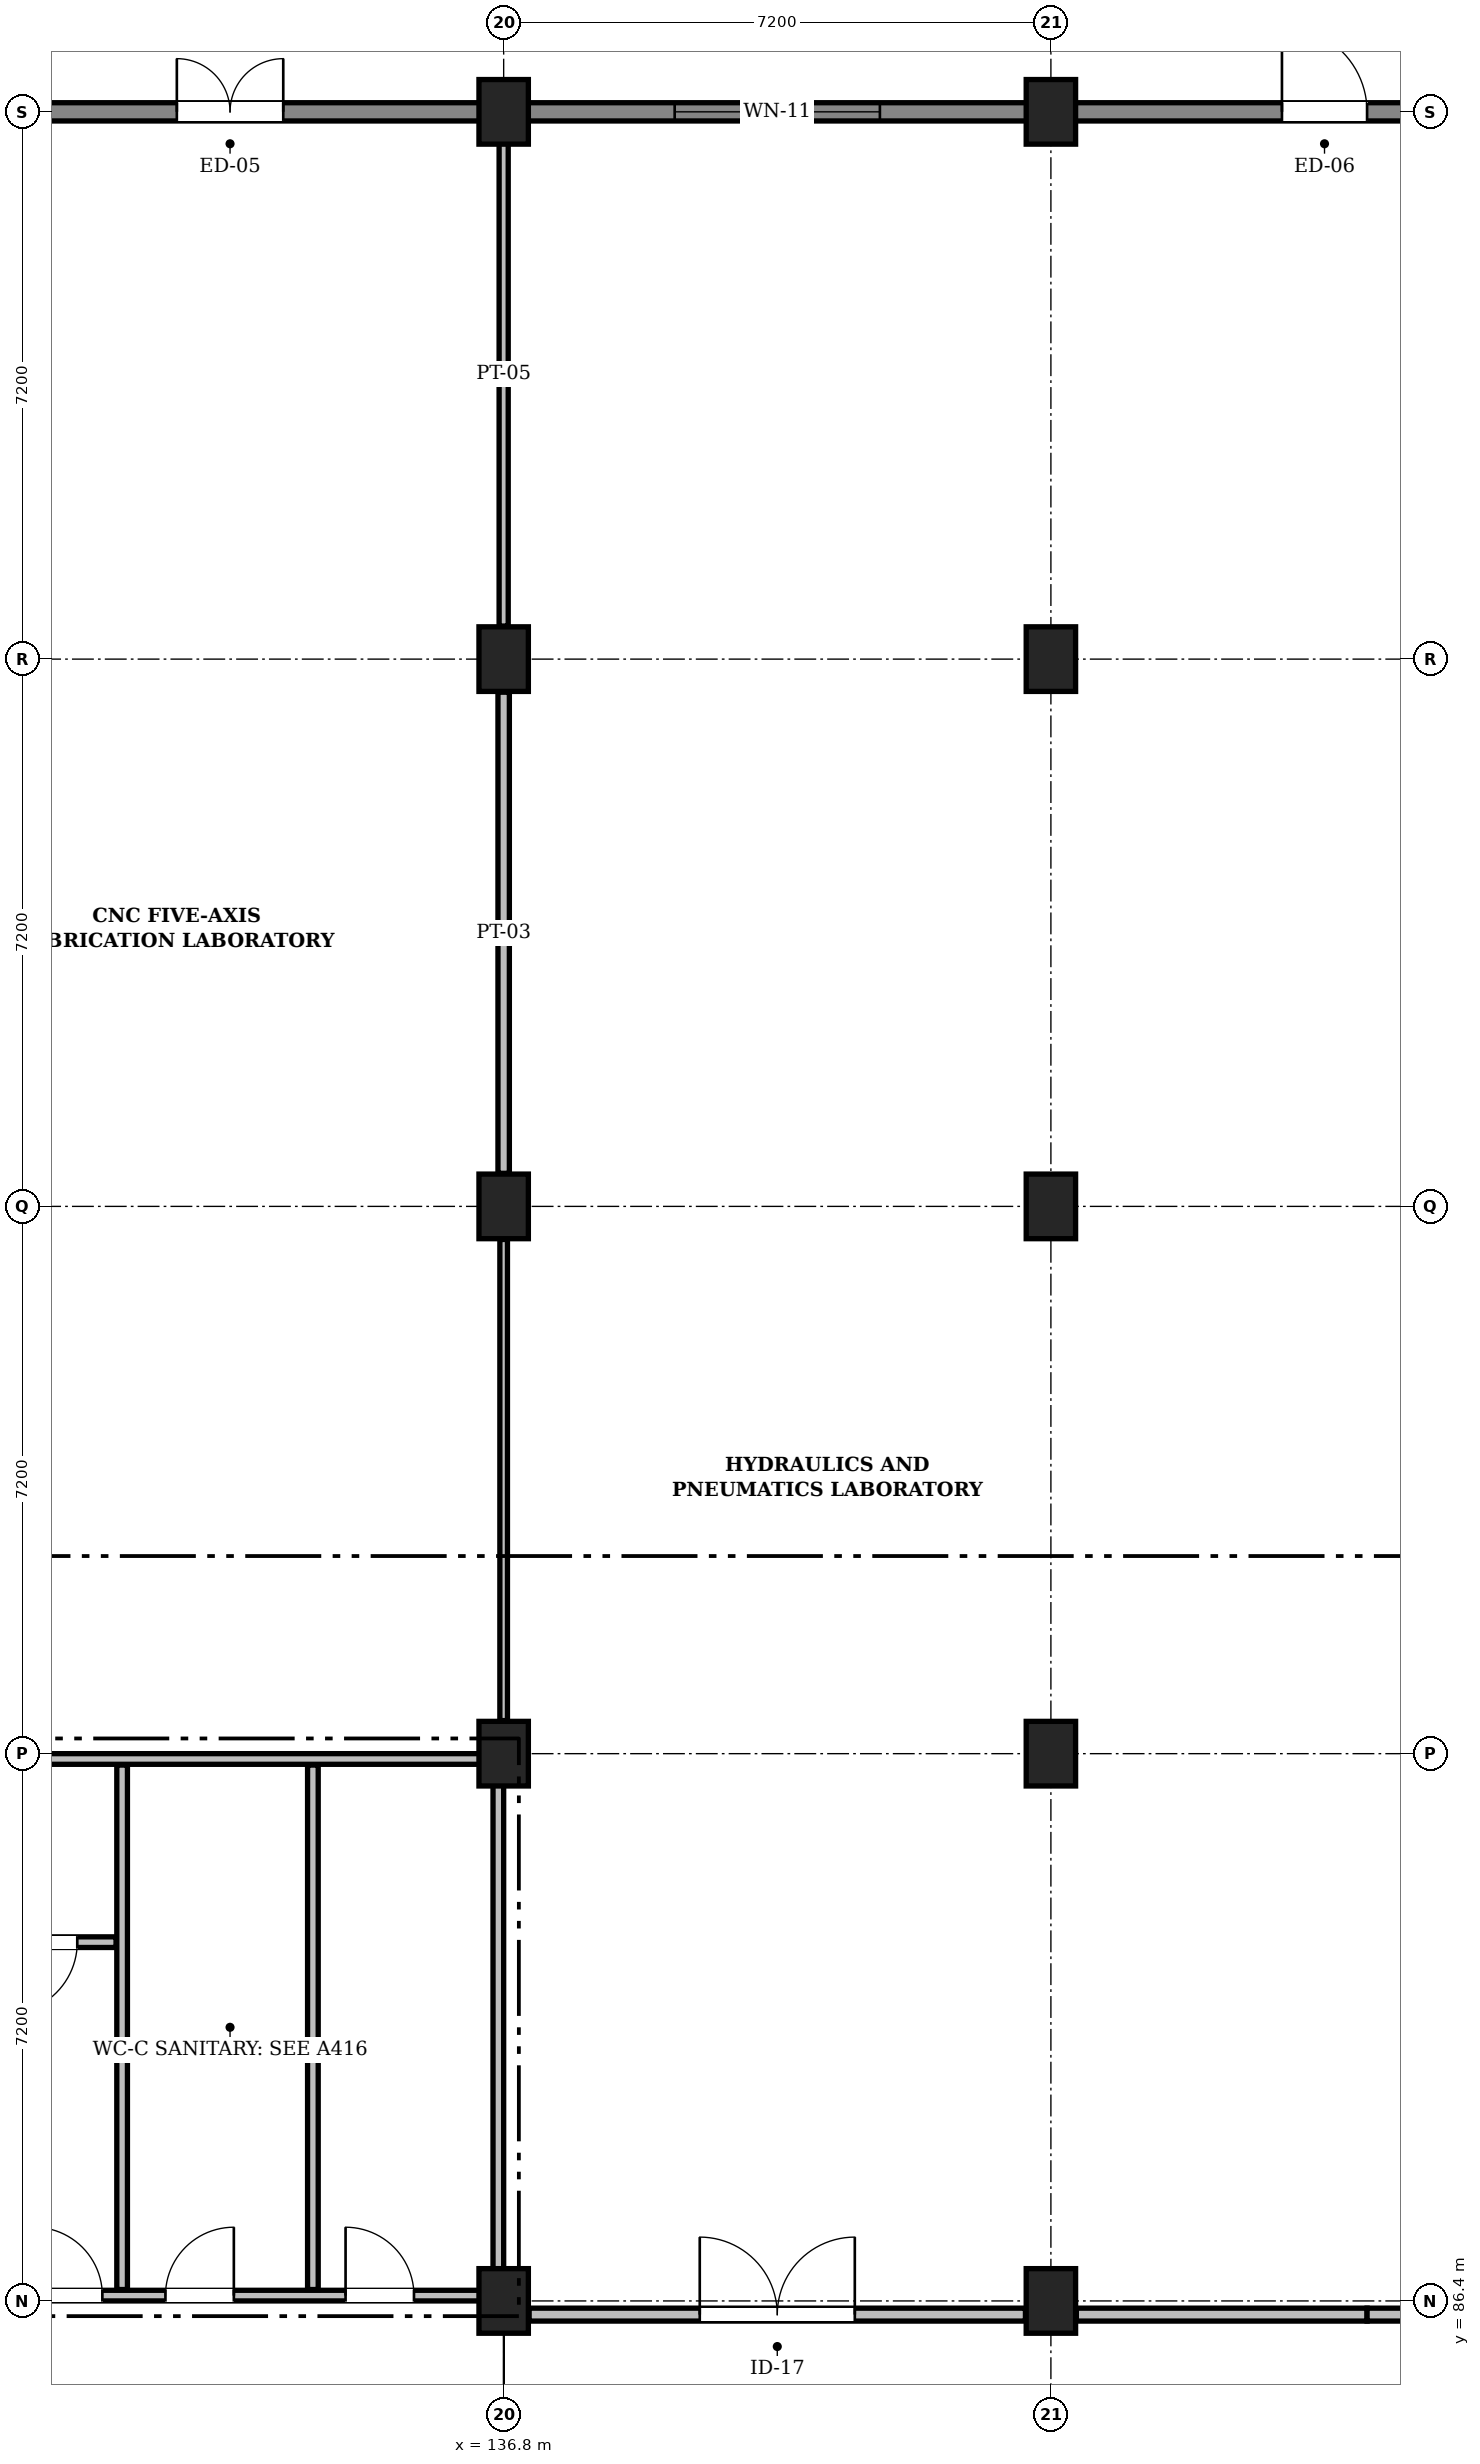
"""IFC4 building model, lengths in metres.
Left out: names, types, materials, properties, quantities, classifications, styles, units other than length and angle.
Written with IfcOpenShell. Run it as: python <this file> out.ifc"""

import sys

from ifc_helpers import new_model, si_unit, direction, frame, frame_2d, origin, origin_2d, place, context, subcontext, project, spatial, rectangle, extrude, element, fill, save


model = new_model("IFC4")
c1 = context("Model", 3, precision=1e-05, world=origin(), true_north=direction((0.0, 1.0)))
c2 = subcontext(c1, "Body", "Model", "MODEL_VIEW")
j1 = project(units=[si_unit("LENGTHUNIT", "METRE"), si_unit("PLANEANGLEUNIT", "RADIAN")], contexts=[c1])
p1 = place(None, origin())
s1 = spatial("IfcSite", under=j1, at=p1, CompositionType="ELEMENT")
p2 = place(p1, origin())
s2 = spatial("IfcBuilding", under=s1, at=p2, CompositionType="ELEMENT")
p3 = place(p2, origin())
s3 = spatial("IfcBuildingStorey", under=s2, at=p3, CompositionType="ELEMENT", Elevation=0.0)
for number, where, z_axis, x_axis in (
    (1, (136.8, 86.4, 0.0), (0.0, 0.0, 1.0), (1.0, 0.0, 0.0)),
    (2, (136.8, 93.6, 0.0), (0.0, 0.0, 1.0), (1.0, 0.0, 0.0)),
    (3, (136.8, 100.8, 0.0), (0.0, 0.0, 1.0), (1.0, 0.0, 0.0)),
    (4, (136.8, 108.0, 0.0), (0.0, 0.0, 1.0), (1.0, 0.0, 0.0)),
    (5, (136.8, 115.2, 0.0), (0.0, 0.0, 1.0), (1.0, 0.0, 0.0)),
    (6, (144.0, 86.4, 0.0), (0.0, 0.0, 1.0), (1.0, 0.0, 0.0)),
    (7, (144.0, 93.6, 0.0), (0.0, 0.0, 1.0), (1.0, 0.0, 0.0)),
    (8, (144.0, 100.8, 0.0), (0.0, 0.0, 1.0), (1.0, 0.0, 0.0)),
    (9, (144.0, 108.0, 0.0), (0.0, 0.0, 1.0), (1.0, 0.0, 0.0)),
    (10, (144.0, 115.2, 0.0), (0.0, 0.0, 1.0), (1.0, 0.0, 0.0)),
):
    element("IfcColumn", number, at=place(p3, frame(where, z_axis=z_axis, x_axis=x_axis)), inside=s3, PredefinedType="COLUMN", context=c2, shape_type="SweptSolid", body=[
        extrude(rectangle(XDim=0.65, YDim=0.85, at=origin_2d()), origin(), (0.0, 0.0, 1.0), 4.8),
    ])
p4 = place(p3, frame((129.6, 115.2, 0.0), z_axis=(0.0, 0.0, 1.0), x_axis=(1.0, 0.0, 0.0)))
e11 = element("IfcWall", 11, at=p4, inside=s3, PredefinedType="SOLIDWALL", context=c2, shape_type="SweptSolid", body=[
    extrude(rectangle(XDim=7.2, YDim=0.24, at=frame_2d((3.6, 0.0))), origin(), (0.0, 0.0, 1.0), 4.52),
])
p5 = place(p4, frame((2.9, 0.0, 0.0)))
e12 = element("IfcOpeningElement", 12, at=p5, cuts=e11, PredefinedType="OPENING", context=c2, shape_type="SweptSolid", body=[
    extrude(rectangle(XDim=1.4, YDim=2.15, at=frame_2d((0.7, 1.075))), frame((0.0, 0.132, 0.0), z_axis=(0.0, -1.0, 0.0), x_axis=(1.0, 0.0, 0.0)), (0.0, 0.0, 1.0), 0.264),
])
p6 = place(p3, frame((136.8, 115.2, 0.0), z_axis=(0.0, 0.0, 1.0), x_axis=(1.0, 0.0, 0.0)))
e13 = element("IfcWall", 13, at=p6, inside=s3, PredefinedType="SOLIDWALL", context=c2, shape_type="SweptSolid", body=[
    extrude(rectangle(XDim=7.2, YDim=0.24, at=frame_2d((3.6, 0.0))), origin(), (0.0, 0.0, 1.0), 4.52),
])
p7 = place(p6, frame((2.25, 0.0, 0.95)))
e14 = element("IfcOpeningElement", 14, at=p7, cuts=e13, PredefinedType="OPENING", context=c2, shape_type="SweptSolid", body=[
    extrude(rectangle(XDim=2.7, YDim=1.3, at=frame_2d((1.35, 0.65))), frame((0.0, 0.132, 0.0), z_axis=(0.0, -1.0, 0.0), x_axis=(1.0, 0.0, 0.0)), (0.0, 0.0, 1.0), 0.264),
])
p8 = place(p3, frame((144.0, 115.2, 0.0), z_axis=(0.0, 0.0, 1.0), x_axis=(1.0, 0.0, 0.0)))
e15 = element("IfcWall", 15, at=p8, inside=s3, PredefinedType="SOLIDWALL", context=c2, shape_type="SweptSolid", body=[
    extrude(rectangle(XDim=7.2, YDim=0.24, at=frame_2d((3.6, 0.0))), origin(), (0.0, 0.0, 1.0), 4.52),
])
p9 = place(p8, frame((3.04, 0.0, 0.0)))
e16 = element("IfcOpeningElement", 16, at=p9, cuts=e15, PredefinedType="OPENING", context=c2, shape_type="SweptSolid", body=[
    extrude(rectangle(XDim=1.12, YDim=2.15, at=frame_2d((0.56, 1.075))), frame((0.0, 0.132, 0.0), z_axis=(0.0, -1.0, 0.0), x_axis=(1.0, 0.0, 0.0)), (0.0, 0.0, 1.0), 0.264),
])
p10 = place(p3, frame((129.67, 86.47, 0.0), z_axis=(0.0, 0.0, 1.0), x_axis=(1.0, 0.0, 0.0)))
e17 = element("IfcWall", 17, at=p10, inside=s3, PredefinedType="PARTITIONING", context=c2, shape_type="SweptSolid", body=[
    extrude(rectangle(XDim=7.06, YDim=0.14, at=frame_2d((3.53, 0.0))), origin(), (0.0, 0.0, 1.0), 3.8),
])
p11 = place(p10, frame((0.95, 0.0, 0.0)))
e18 = element("IfcOpeningElement", 18, at=p11, cuts=e17, PredefinedType="OPENING", context=c2, shape_type="SweptSolid", body=[
    extrude(rectangle(XDim=0.9, YDim=2.08, at=frame_2d((0.45, 1.04))), frame((0.0, 0.082, 0.0), z_axis=(0.0, -1.0, 0.0), x_axis=(1.0, 0.0, 0.0)), (0.0, 0.0, 1.0), 0.164),
])
p12 = place(p10, frame((2.68, 0.0, 0.0)))
e19 = element("IfcOpeningElement", 19, at=p12, cuts=e17, PredefinedType="OPENING", context=c2, shape_type="SweptSolid", body=[
    extrude(rectangle(XDim=0.9, YDim=2.08, at=frame_2d((0.45, 1.04))), frame((0.0, 0.082, 0.0), z_axis=(0.0, -1.0, 0.0), x_axis=(1.0, 0.0, 0.0)), (0.0, 0.0, 1.0), 0.164),
])
p13 = place(p10, frame((5.05, 0.0, 0.0)))
e20 = element("IfcOpeningElement", 20, at=p13, cuts=e17, PredefinedType="OPENING", context=c2, shape_type="SweptSolid", body=[
    extrude(rectangle(XDim=0.9, YDim=2.08, at=frame_2d((0.45, 1.04))), frame((0.0, 0.082, 0.0), z_axis=(0.0, -1.0, 0.0), x_axis=(1.0, 0.0, 0.0)), (0.0, 0.0, 1.0), 0.164),
])
p14 = place(p3, frame((129.67, 93.53, 0.0), z_axis=(0.0, 0.0, 1.0), x_axis=(1.0, 0.0, 0.0)))
e21 = element("IfcWall", 21, at=p14, inside=s3, PredefinedType="PARTITIONING", context=c2, shape_type="SweptSolid", body=[
    extrude(rectangle(XDim=7.06, YDim=0.14, at=frame_2d((3.53, 0.0))), origin(), (0.0, 0.0, 1.0), 3.8),
])
p15 = place(p3, frame((136.73, 86.55, 0.0), z_axis=(0.0, 0.0, 1.0), x_axis=(0.0, 1.0, 0.0)))
e22 = element("IfcWall", 22, at=p15, inside=s3, PredefinedType="PARTITIONING", context=c2, shape_type="SweptSolid", body=[
    extrude(rectangle(XDim=6.9, YDim=0.14, at=frame_2d((3.45, 0.0))), origin(), (0.0, 0.0, 1.0), 4.08),
])
for number, where, z_axis, x_axis in (
    (23, (131.78, 86.55, 0.0), (0.0, 0.0, 1.0), (0.0, 1.0, 0.0)),
    (24, (134.29, 86.55, 0.0), (0.0, 0.0, 1.0), (0.0, 1.0, 0.0)),
):
    element("IfcWall", number, at=place(p3, frame(where, z_axis=z_axis, x_axis=x_axis)), inside=s3, PredefinedType="PARTITIONING", context=c2, shape_type="SweptSolid", body=[
        extrude(rectangle(XDim=6.9, YDim=0.14, at=frame_2d((3.45, 0.0))), origin(), (0.0, 0.0, 1.0), 4.46),
    ])
p16 = place(p3, frame((129.75, 91.12, 0.0), z_axis=(0.0, 0.0, 1.0), x_axis=(1.0, 0.0, 0.0)))
e25 = element("IfcWall", 25, at=p16, inside=s3, PredefinedType="PARTITIONING", context=c2, shape_type="SweptSolid", body=[
    extrude(rectangle(XDim=1.95, YDim=0.14, at=frame_2d((0.975, 0.0))), origin(), (0.0, 0.0, 1.0), 4.46),
])
p17 = place(p16, frame((0.5, 0.0, 0.0)))
e26 = element("IfcOpeningElement", 26, at=p17, cuts=e25, PredefinedType="OPENING", context=c2, shape_type="SweptSolid", body=[
    extrude(rectangle(XDim=0.94, YDim=2.1, at=frame_2d((0.47, 1.05))), frame((0.0, 0.082, 0.0), z_axis=(0.0, -1.0, 0.0), x_axis=(1.0, 0.0, 0.0)), (0.0, 0.0, 1.0), 0.164),
])
p18 = place(p3, frame((137.135, 86.22, 0.0), z_axis=(0.0, 0.0, 1.0), x_axis=(1.0, 0.0, 0.0)))
e27 = element("IfcWall", 27, at=p18, inside=s3, PredefinedType="PARTITIONING", context=c2, shape_type="SweptSolid", body=[
    extrude(rectangle(XDim=6.53, YDim=0.17, at=frame_2d((3.265, 0.0))), origin(), (0.0, 0.0, 1.0), 3.8),
])
p19 = place(p18, frame((2.245, 0.0, 0.0)))
e28 = element("IfcOpeningElement", 28, at=p19, cuts=e27, PredefinedType="OPENING", context=c2, shape_type="SweptSolid", body=[
    extrude(rectangle(XDim=2.04, YDim=2.34, at=frame_2d((1.02, 1.17))), frame((0.0, 0.097, 0.0), z_axis=(0.0, -1.0, 0.0), x_axis=(1.0, 0.0, 0.0)), (0.0, 0.0, 1.0), 0.194),
])
p20 = place(p3, frame((144.335, 86.22, 0.0), z_axis=(0.0, 0.0, 1.0), x_axis=(1.0, 0.0, 0.0)))
e29 = element("IfcWall", 29, at=p20, inside=s3, PredefinedType="PARTITIONING", context=c2, shape_type="SweptSolid", body=[
    extrude(rectangle(XDim=3.825, YDim=0.17, at=frame_2d((1.913, 0.0))), origin(), (0.0, 0.0, 1.0), 3.8),
])
p21 = place(p3, frame((148.16, 86.22, 0.0), z_axis=(0.0, 0.0, 1.0), x_axis=(1.0, 0.0, 0.0)))
e30 = element("IfcWall", 30, at=p21, inside=s3, PredefinedType="PARTITIONING", context=c2, shape_type="SweptSolid", body=[
    extrude(rectangle(XDim=2.325, YDim=0.17, at=frame_2d((1.163, 0.0))), origin(), (0.0, 0.0, 1.0), 3.8),
])
p22 = place(p3, frame((136.8, 94.035, 0.0), z_axis=(0.0, 0.0, 1.0), x_axis=(0.0, 1.0, 0.0)))
e31 = element("IfcWall", 31, at=p22, inside=s3, PredefinedType="PARTITIONING", context=c2, shape_type="SweptSolid", body=[
    extrude(rectangle(XDim=6.33, YDim=0.1, at=frame_2d((3.165, 0.0))), origin(), (0.0, 0.0, 1.0), 4.08),
])
p23 = place(p3, frame((136.8, 101.235, 0.0), z_axis=(0.0, 0.0, 1.0), x_axis=(0.0, 1.0, 0.0)))
e32 = element("IfcWall", 32, at=p23, inside=s3, PredefinedType="PARTITIONING", context=c2, shape_type="SweptSolid", body=[
    extrude(rectangle(XDim=6.33, YDim=0.15, at=frame_2d((3.165, 0.0))), origin(), (0.0, 0.0, 1.0), 4.08),
])
p24 = place(p3, frame((136.8, 108.435, 0.0), z_axis=(0.0, 0.0, 1.0), x_axis=(0.0, 1.0, 0.0)))
e33 = element("IfcWall", 33, at=p24, inside=s3, PredefinedType="PARTITIONING", context=c2, shape_type="SweptSolid", body=[
    extrude(rectangle(XDim=6.633, YDim=0.12, at=frame_2d((3.316, 0.0))), origin(), (0.0, 0.0, 1.0), 4.08),
])
p25 = place(p5, origin())
e34 = element("IfcDoor", 34, at=p25, inside=s3, OperationType="DOUBLE_DOOR_SINGLE_SWING", PredefinedType="DOOR", context=c2, shape_type="SweptSolid", body=[
    extrude(rectangle(XDim=1.4, YDim=2.15, at=frame_2d((0.7, 1.075))), frame((0.0, 0.025, 0.0), z_axis=(0.0, -1.0, 0.0), x_axis=(1.0, 0.0, 0.0)), (0.0, 0.0, 1.0), 0.05),
])
fill(e12, e34)
p26 = place(p7, origin())
e35 = element("IfcWindow", 35, at=p26, inside=s3, PartitioningType="SINGLE_PANEL", PredefinedType="WINDOW", context=c2, shape_type="SweptSolid", body=[
    extrude(rectangle(XDim=2.7, YDim=1.3, at=frame_2d((1.35, 0.65))), frame((0.0, 0.03, 0.0), z_axis=(0.0, -1.0, 0.0), x_axis=(1.0, 0.0, 0.0)), (0.0, 0.0, 1.0), 0.06),
])
fill(e14, e35)
p27 = place(p9, origin())
e36 = element("IfcDoor", 36, at=p27, inside=s3, OperationType="SINGLE_SWING_LEFT", PredefinedType="DOOR", context=c2, shape_type="SweptSolid", body=[
    extrude(rectangle(XDim=1.12, YDim=2.15, at=frame_2d((0.56, 1.075))), frame((0.0, 0.025, 0.0), z_axis=(0.0, -1.0, 0.0), x_axis=(1.0, 0.0, 0.0)), (0.0, 0.0, 1.0), 0.05),
])
fill(e16, e36)
p28 = place(p11, origin())
e37 = element("IfcDoor", 37, at=p28, inside=s3, OperationType="SINGLE_SWING_LEFT", PredefinedType="DOOR", context=c2, shape_type="SweptSolid", body=[
    extrude(rectangle(XDim=0.9, YDim=2.08, at=frame_2d((0.45, 1.04))), frame((0.0, 0.025, 0.0), z_axis=(0.0, -1.0, 0.0), x_axis=(1.0, 0.0, 0.0)), (0.0, 0.0, 1.0), 0.05),
])
fill(e18, e37)
p29 = place(p12, origin())
e38 = element("IfcDoor", 38, at=p29, inside=s3, OperationType="SINGLE_SWING_RIGHT", PredefinedType="DOOR", context=c2, shape_type="SweptSolid", body=[
    extrude(rectangle(XDim=0.9, YDim=2.08, at=frame_2d((0.45, 1.04))), frame((0.0, 0.025, 0.0), z_axis=(0.0, -1.0, 0.0), x_axis=(1.0, 0.0, 0.0)), (0.0, 0.0, 1.0), 0.05),
])
fill(e19, e38)
p30 = place(p13, origin())
e39 = element("IfcDoor", 39, at=p30, inside=s3, OperationType="SINGLE_SWING_LEFT", PredefinedType="DOOR", context=c2, shape_type="SweptSolid", body=[
    extrude(rectangle(XDim=0.9, YDim=2.08, at=frame_2d((0.45, 1.04))), frame((0.0, 0.025, 0.0), z_axis=(0.0, -1.0, 0.0), x_axis=(1.0, 0.0, 0.0)), (0.0, 0.0, 1.0), 0.05),
])
fill(e20, e39)
p31 = place(p17, frame((0.94, 0.0, 0.0), z_axis=(0.0, 0.0, 1.0), x_axis=(-1.0, 0.0, 0.0)))
e40 = element("IfcDoor", 40, at=p31, inside=s3, OperationType="SINGLE_SWING_RIGHT", PredefinedType="DOOR", context=c2, shape_type="SweptSolid", body=[
    extrude(rectangle(XDim=0.94, YDim=2.1, at=frame_2d((0.47, 1.05))), frame((0.0, 0.025, 0.0), z_axis=(0.0, -1.0, 0.0), x_axis=(1.0, 0.0, 0.0)), (0.0, 0.0, 1.0), 0.05),
])
fill(e26, e40)
p32 = place(p19, origin())
e41 = element("IfcDoor", 41, at=p32, inside=s3, OperationType="DOUBLE_DOOR_SINGLE_SWING", PredefinedType="DOOR", context=c2, shape_type="SweptSolid", body=[
    extrude(rectangle(XDim=2.04, YDim=2.34, at=frame_2d((1.02, 1.17))), frame((0.0, 0.025, 0.0), z_axis=(0.0, -1.0, 0.0), x_axis=(1.0, 0.0, 0.0)), (0.0, 0.0, 1.0), 0.05),
])
fill(e28, e41)
save(model, sys.argv[1])
